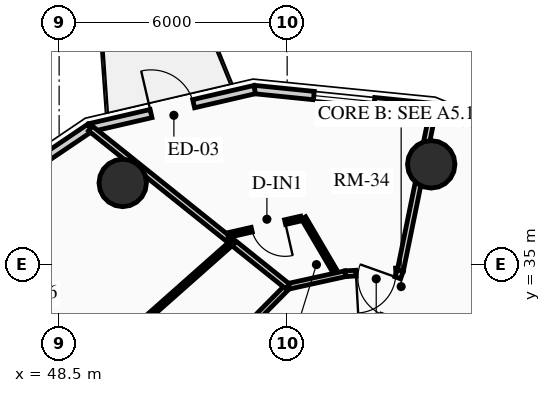
"""IFC4 building model, lengths in metres.
Left out: names, types, materials, properties, quantities, classifications, styles, units other than length and angle.
Written with IfcOpenShell. Run it as: python <this file> out.ifc"""

import sys

from ifc_helpers import new_model, si_unit, direction, frame, frame_2d, origin, origin_2d, place, context, subcontext, project, spatial, rectangle, circle, extrude, source, transform, mapped, element, fill, save


model = new_model("IFC4")
c1 = context("Model", 3, precision=1e-05, world=origin(), true_north=direction((0.0, 1.0)))
c2 = subcontext(c1, "Body", "Model", "MODEL_VIEW")
j1 = project(units=[si_unit("LENGTHUNIT", "METRE"), si_unit("PLANEANGLEUNIT", "RADIAN")], contexts=[c1])
p1 = place(None, origin())
s1 = spatial("IfcSite", under=j1, at=p1, CompositionType="ELEMENT")
p2 = place(p1, origin())
s2 = spatial("IfcBuilding", under=s1, at=p2, CompositionType="ELEMENT")
p3 = place(p2, frame((0.0, 0.0, 171.97)))
s3 = spatial("IfcBuildingStorey", under=s2, at=p3, CompositionType="ELEMENT", Elevation=171.97)
for number, where, z_axis, x_axis in (
    (1, (58.291, 37.635, 0.0), (0.0, 0.0, 1.0), (1.0, 0.0, 0.0)),
    (2, (50.173, 37.146, 0.0), (0.0, 0.0, 1.0), (1.0, 0.0, 0.0)),
):
    element("IfcColumn", number, at=place(p3, frame(where, z_axis=z_axis, x_axis=x_axis)), inside=s3, PredefinedType="USERDEFINED", context=c2, shape_type="SweptSolid", body=[
        extrude(circle(Radius=0.625, at=origin_2d()), origin(), (0.0, 0.0, 1.0), 2.91),
    ])
p4 = place(p3, frame((58.354, 39.127, 0.0), z_axis=(0.0, 0.0, 1.0), x_axis=(0.924556017656, -0.381046152345, 0.0)))
e3 = element("IfcWall", 3, at=p4, inside=s3, PredefinedType="SOLIDWALL", context=c2, shape_type="SweptSolid", body=[
    extrude(rectangle(XDim=0.87, YDim=0.22, at=frame_2d((0.435, 0.0))), origin(), (0.0, 0.0, 1.0), 2.245),
])
p5 = place(p3, frame((53.645, 39.603, 0.0), z_axis=(0.0, 0.0, 1.0), x_axis=(0.994943283129, -0.100438356004, 0.0)))
e4 = element("IfcWall", 4, at=p5, inside=s3, PredefinedType="SOLIDWALL", context=c2, shape_type="SweptSolid", body=[
    extrude(rectangle(XDim=4.733, YDim=0.22, at=frame_2d((2.366, 0.0))), origin(), (0.0, 0.0, 1.0), 2.245),
])
m1 = source(origin(), c2, "Body", "SweptSolid", [
    extrude(rectangle(XDim=1.6, YDim=1.3, at=frame_2d((0.8, 0.65))), frame((0.0, 0.12, 0.0), z_axis=(0.0, -1.0, 0.0), x_axis=(1.0, 0.0, 0.0)), (0.0, 0.0, 1.0), 0.24),
])
p6 = place(p5, frame((1.566, 0.0, 0.65)))
e5 = element("IfcOpeningElement", 5, at=p6, cuts=e4, PredefinedType="OPENING", context=c2, shape_type="MappedRepresentation", body=[
    mapped(m1, transform((0.0, 0.0, 0.0), x_axis=(1.0, 0.0, 0.0), y_axis=(0.0, 1.0, 0.0), z_axis=(0.0, 0.0, 1.0), scale=1.0)),
])
p7 = place(p3, frame((49.313, 38.6, 0.0), z_axis=(0.0, 0.0, 1.0), x_axis=(0.97422620202, 0.22557328587, 0.0)))
e6 = element("IfcWall", 6, at=p7, inside=s3, PredefinedType="SOLIDWALL", context=c2, shape_type="SweptSolid", body=[
    extrude(rectangle(XDim=4.446, YDim=0.22, at=frame_2d((2.223, 0.0))), origin(), (0.0, 0.0, 1.0), 2.245),
])
m2 = source(origin(), c2, "Body", "SweptSolid", [
    extrude(rectangle(XDim=1.15, YDim=2.005, at=frame_2d((0.575, 1.002))), frame((0.0, 0.12, 0.0), z_axis=(0.0, -1.0, 0.0), x_axis=(1.0, 0.0, 0.0)), (0.0, 0.0, 1.0), 0.24),
])
p8 = place(p7, frame((1.648, 0.0, 0.0)))
e7 = element("IfcOpeningElement", 7, at=p8, cuts=e6, PredefinedType="OPENING", context=c2, shape_type="MappedRepresentation", body=[
    mapped(m2, transform((0.0, 0.0, 0.0), x_axis=(1.0, 0.0, 0.0), y_axis=(0.0, 1.0, 0.0), z_axis=(0.0, 0.0, 1.0), scale=1.0)),
])
p9 = place(p3, frame((45.783, 36.217, 0.0), z_axis=(0.0, 0.0, 1.0), x_axis=(0.828817439852, 0.55951912514, 0.0)))
e8 = element("IfcWall", 8, at=p9, inside=s3, PredefinedType="SOLIDWALL", context=c2, shape_type="SweptSolid", body=[
    extrude(rectangle(XDim=4.259, YDim=0.22, at=frame_2d((2.129, 0.0))), origin(), (0.0, 0.0, 1.0), 2.245),
])
p10 = place(p3, frame((57.478, 34.838, 0.0), z_axis=(0.0, 0.0, 1.0), x_axis=(-0.998448388303, -0.05568497011, 0.0)))
e9 = element("IfcWall", 9, at=p10, inside=s3, PredefinedType="PARTITIONING", context=c2, shape_type="SweptSolid", body=[
    extrude(rectangle(XDim=1.447, YDim=0.15, at=frame_2d((0.723, 0.0))), origin(), (0.0, 0.0, 1.0), 2.245),
])
m3 = source(origin(), c2, "Body", "SweptSolid", [
    extrude(rectangle(XDim=1.05, YDim=2.015, at=frame_2d((0.525, 1.007))), frame((0.0, 0.085, 0.0), z_axis=(0.0, -1.0, 0.0), x_axis=(1.0, 0.0, 0.0)), (0.0, 0.0, 1.0), 0.17),
])
p11 = place(p10, frame((0.12, 0.0, 0.0)))
e10 = element("IfcOpeningElement", 10, at=p11, cuts=e9, PredefinedType="OPENING", context=c2, shape_type="MappedRepresentation", body=[
    mapped(m3, transform((0.0, 0.0, 0.0), x_axis=(1.0, 0.0, 0.0), y_axis=(0.0, 1.0, 0.0), z_axis=(0.0, 0.0, 1.0), scale=1.0)),
])
p12 = place(p3, frame((56.033, 34.757, 0.0), z_axis=(0.0, 0.0, 1.0), x_axis=(-0.976507263775, -0.215484486204, 0.0)))
e11 = element("IfcWall", 11, at=p12, inside=s3, PredefinedType="PARTITIONING", context=c2, shape_type="SweptSolid", body=[
    extrude(rectangle(XDim=1.556, YDim=0.15, at=frame_2d((0.778, 0.0))), origin(), (0.0, 0.0, 1.0), 2.245),
])
p13 = place(p3, frame((54.514, 34.422, 0.0), z_axis=(0.0, 0.0, 1.0), x_axis=(-0.703289573518, -0.710903492593, 0.0)))
e12 = element("IfcWall", 12, at=p13, inside=s3, PredefinedType="PARTITIONING", context=c2, shape_type="SweptSolid", body=[
    extrude(rectangle(XDim=3.303, YDim=0.15, at=frame_2d((1.651, 0.0))), origin(), (0.0, 0.0, 1.0), 2.245),
])
p14 = place(p3, frame((57.478, 34.838, 0.0), z_axis=(0.0, 0.0, 1.0), x_axis=(0.200272806445, 0.979740171167, 0.0)))
e13 = element("IfcWall", 13, at=p14, inside=s3, PredefinedType="PARTITIONING", context=c2, shape_type="SweptSolid", body=[
    extrude(rectangle(XDim=4.358, YDim=0.16, at=frame_2d((2.179, 0.0))), origin(), (0.0, 0.0, 1.0), 2.245),
])
p15 = place(p3, frame((54.514, 34.422, 0.0), z_axis=(0.0, 0.0, 1.0), x_axis=(-0.780385234796, 0.625299036712, 0.0)))
e14 = element("IfcWall", 14, at=p15, inside=s3, PredefinedType="PARTITIONING", context=c2, shape_type="SweptSolid", body=[
    extrude(rectangle(XDim=6.653, YDim=0.16, at=frame_2d((3.326, 0.0))), origin(), (0.0, 0.0, 1.0), 2.245),
])
p16 = place(p3, frame((56.828, 33.021, 0.0), z_axis=(0.0, 0.0, 1.0), x_axis=(0.336608838259, 0.941644566705, 0.0)))
e15 = element("IfcWall", 15, at=p16, inside=s3, PredefinedType="PARTITIONING", context=c2, shape_type="SweptSolid", body=[
    extrude(rectangle(XDim=1.93, YDim=0.16, at=frame_2d((0.965, 0.0))), origin(), (0.0, 0.0, 1.0), 2.245),
])
m4 = source(origin(), c2, "Body", "SweptSolid", [
    extrude(rectangle(XDim=1.05, YDim=2.015, at=frame_2d((0.525, 1.007))), frame((0.0, 0.09, 0.0), z_axis=(0.0, -1.0, 0.0), x_axis=(1.0, 0.0, 0.0)), (0.0, 0.0, 1.0), 0.18),
])
p17 = place(p16, frame((0.68, 0.0, 0.0)))
e16 = element("IfcOpeningElement", 16, at=p17, cuts=e15, PredefinedType="OPENING", context=c2, shape_type="MappedRepresentation", body=[
    mapped(m4, transform((0.0, 0.0, 0.0), x_axis=(1.0, 0.0, 0.0), y_axis=(0.0, 1.0, 0.0), z_axis=(0.0, 0.0, 1.0), scale=1.0)),
])
p18 = place(p3, frame((55.737, 34.853, 0.0), z_axis=(0.0, 0.0, 1.0), x_axis=(-0.506282425857, 0.862367732043, 0.0)))
e17 = element("IfcWall", 17, at=p18, inside=s3, PredefinedType="PARTITIONING", context=c2, shape_type="SweptSolid", body=[
    extrude(rectangle(XDim=1.591, YDim=0.125, at=frame_2d((0.796, 0.0))), origin(), (0.0, 0.0, 1.0), 2.245),
])
p19 = place(p3, frame((54.871, 36.211, 0.0), z_axis=(0.0, 0.0, 1.0), x_axis=(-0.975212623293, -0.221269833846, 0.0)))
e18 = element("IfcWall", 18, at=p19, inside=s3, PredefinedType="PARTITIONING", context=c2, shape_type="SweptSolid", body=[
    extrude(rectangle(XDim=1.983, YDim=0.125, at=frame_2d((0.991, 0.0))), origin(), (0.0, 0.0, 1.0), 2.675),
])
m5 = source(origin(), c2, "Body", "SweptSolid", [
    extrude(rectangle(XDim=0.9, YDim=2.005, at=frame_2d((0.45, 1.002))), frame((0.0, 0.073, 0.0), z_axis=(0.0, -1.0, 0.0), x_axis=(1.0, 0.0, 0.0)), (0.0, 0.0, 1.0), 0.145),
])
p20 = place(p19, frame((0.436, 0.0, 0.0)))
e19 = element("IfcOpeningElement", 19, at=p20, cuts=e18, PredefinedType="OPENING", context=c2, shape_type="MappedRepresentation", body=[
    mapped(m5, transform((0.0, 0.0, 0.0), x_axis=(1.0, 0.0, 0.0), y_axis=(0.0, 1.0, 0.0), z_axis=(0.0, 0.0, 1.0), scale=1.0)),
])
p21 = place(p3, frame((53.06, 35.587, 0.0), z_axis=(0.0, 0.0, 1.0), x_axis=(-0.748390346028, -0.663258539314, 0.0)))
e20 = element("IfcWall", 20, at=p21, inside=s3, PredefinedType="PARTITIONING", context=c2, shape_type="SweptSolid", body=[
    extrude(rectangle(XDim=3.553, YDim=0.125, at=frame_2d((1.777, 0.0))), origin(), (0.0, 0.0, 1.0), 2.245),
])
m6 = source(origin(), c2, "Body", "SweptSolid", [
    extrude(rectangle(XDim=1.6, YDim=1.3, at=frame_2d((0.8, 0.65))), frame((0.0, 0.03, 0.0), z_axis=(0.0, -1.0, 0.0), x_axis=(1.0, 0.0, 0.0)), (0.0, 0.0, 1.0), 0.06),
])
p22 = place(p6, origin())
e21 = element("IfcWindow", 21, at=p22, inside=s3, PartitioningType="SINGLE_PANEL", PredefinedType="WINDOW", context=c2, shape_type="MappedRepresentation", body=[
    mapped(m6, transform((0.0, 0.0, 0.0), x_axis=(1.0, 0.0, 0.0), y_axis=(0.0, 1.0, 0.0), z_axis=(0.0, 0.0, 1.0), scale=1.0)),
])
fill(e5, e21)
m7 = source(origin(), c2, "Body", "SweptSolid", [
    extrude(rectangle(XDim=1.15, YDim=2.005, at=frame_2d((0.575, 1.002))), frame((0.0, 0.025, 0.0), z_axis=(0.0, -1.0, 0.0), x_axis=(1.0, 0.0, 0.0)), (0.0, 0.0, 1.0), 0.05),
])
p23 = place(p8, origin())
e22 = element("IfcDoor", 22, at=p23, inside=s3, OperationType="SINGLE_SWING_LEFT", PredefinedType="DOOR", context=c2, shape_type="MappedRepresentation", body=[
    mapped(m7, transform((0.0, 0.0, 0.0), x_axis=(1.0, 0.0, 0.0), y_axis=(0.0, 1.0, 0.0), z_axis=(0.0, 0.0, 1.0), scale=1.0)),
])
fill(e7, e22)
m8 = source(origin(), c2, "Body", "SweptSolid", [
    extrude(rectangle(XDim=1.05, YDim=2.015, at=frame_2d((0.525, 1.007))), frame((0.0, 0.025, 0.0), z_axis=(0.0, -1.0, 0.0), x_axis=(1.0, 0.0, 0.0)), (0.0, 0.0, 1.0), 0.05),
])
p24 = place(p17, origin())
e23 = element("IfcDoor", 23, at=p24, inside=s3, OperationType="SINGLE_SWING_RIGHT", PredefinedType="DOOR", context=c2, shape_type="MappedRepresentation", body=[
    mapped(m8, transform((0.0, 0.0, 0.0), x_axis=(1.0, 0.0, 0.0), y_axis=(0.0, 1.0, 0.0), z_axis=(0.0, 0.0, 1.0), scale=1.0)),
])
fill(e16, e23)
p25 = place(p11, origin())
e24 = element("IfcDoor", 24, at=p25, inside=s3, OperationType="SINGLE_SWING_RIGHT", PredefinedType="DOOR", context=c2, shape_type="MappedRepresentation", body=[
    mapped(m8, transform((0.0, 0.0, 0.0), x_axis=(1.0, 0.0, 0.0), y_axis=(0.0, 1.0, 0.0), z_axis=(0.0, 0.0, 1.0), scale=1.0)),
])
fill(e10, e24)
m9 = source(origin(), c2, "Body", "SweptSolid", [
    extrude(rectangle(XDim=0.9, YDim=2.005, at=frame_2d((0.45, 1.002))), frame((0.0, 0.025, 0.0), z_axis=(0.0, -1.0, 0.0), x_axis=(1.0, 0.0, 0.0)), (0.0, 0.0, 1.0), 0.05),
])
p26 = place(p20, origin())
e25 = element("IfcDoor", 25, at=p26, inside=s3, OperationType="SINGLE_SWING_LEFT", PredefinedType="DOOR", context=c2, shape_type="MappedRepresentation", body=[
    mapped(m9, transform((0.0, 0.0, 0.0), x_axis=(1.0, 0.0, 0.0), y_axis=(0.0, 1.0, 0.0), z_axis=(0.0, 0.0, 1.0), scale=1.0)),
])
fill(e19, e25)
save(model, sys.argv[1])
